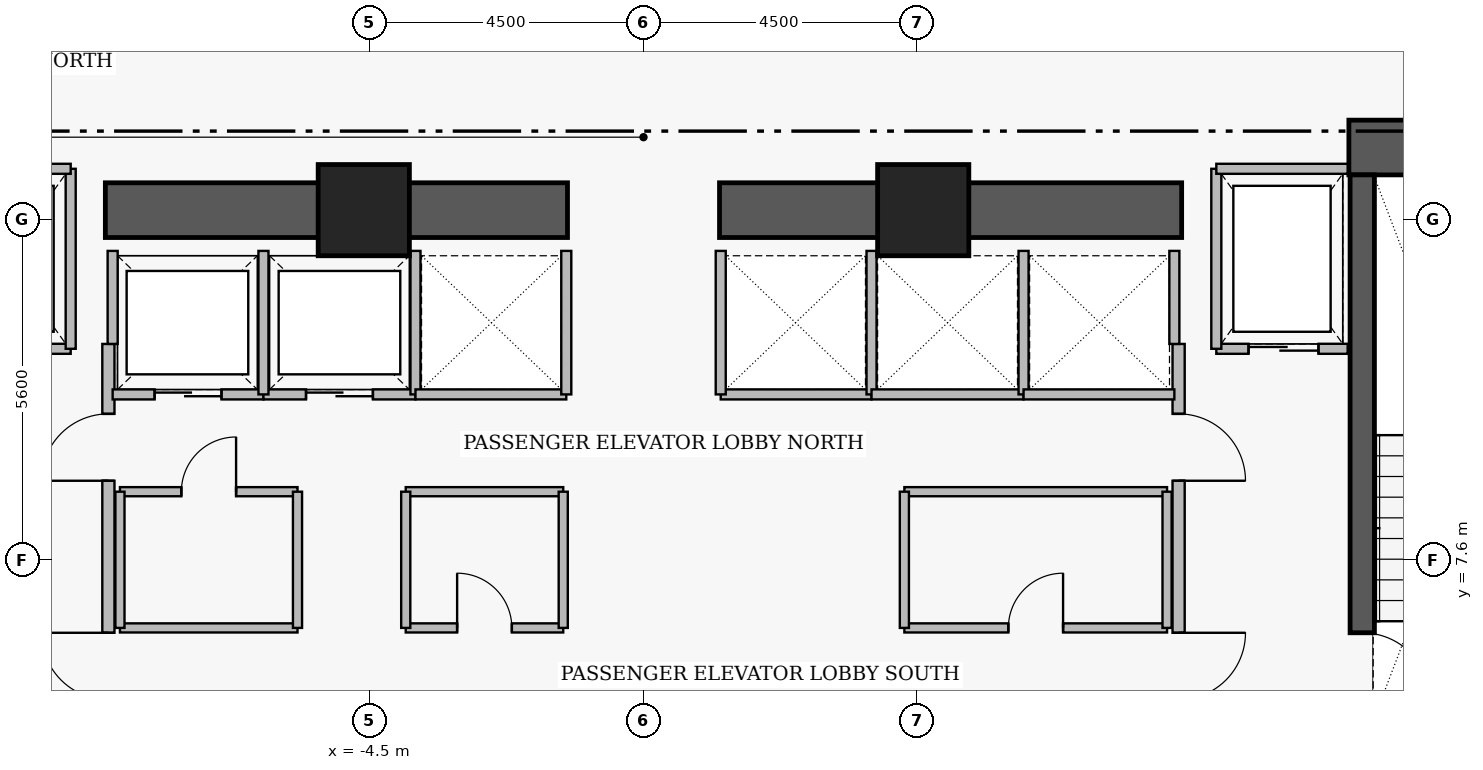
"""IFC4 building model, lengths in metres.
Left out: names, types, materials, properties, quantities, classifications, styles, units other than length and angle.
Written with IfcOpenShell. Run it as: python <this file> out.ifc"""

import sys

from ifc_helpers import new_model, si_unit, direction, frame, frame_2d, origin, origin_2d, place, context, subcontext, project, spatial, rectangle, extrude, element, fill, save


model = new_model("IFC4")
c1 = context("Model", 3, precision=1e-05, world=origin(), true_north=direction((0.0, 1.0)))
c2 = subcontext(c1, "Body", "Model", "MODEL_VIEW")
j1 = project(units=[si_unit("LENGTHUNIT", "METRE"), si_unit("PLANEANGLEUNIT", "RADIAN")], contexts=[c1])
p1 = place(None, origin())
s1 = spatial("IfcSite", under=j1, at=p1, CompositionType="ELEMENT")
p2 = place(p1, origin())
s2 = spatial("IfcBuilding", under=s1, at=p2, CompositionType="ELEMENT")
p3 = place(p2, frame((0.0, 0.0, 71.4)))
s3 = spatial("IfcBuildingStorey", under=s2, at=p3, CompositionType="ELEMENT", Elevation=71.4)
p4 = place(p3, frame((11.6, 14.38, 0.0), z_axis=(0.0, 0.0, 1.0), x_axis=(1.0, 0.0, 0.0)))
e1 = element("IfcWall", 1, at=p4, inside=s3, PredefinedType="SHEAR", context=c2, shape_type="SweptSolid", body=[
    extrude(rectangle(XDim=4.71, YDim=0.9, at=frame_2d((2.355, 0.0))), origin(), (0.0, 0.0, 1.0), 3.46),
])
for number, where, z_axis, x_axis in (
    (2, (-8.85, 13.35, 0.0), (0.0, 0.0, 1.0), (1.0, 0.0, 0.0)),
    (3, (1.25, 13.35, 0.0), (0.0, 0.0, 1.0), (1.0, 0.0, 0.0)),
):
    element("IfcWall", number, at=place(p3, frame(where, z_axis=z_axis, x_axis=x_axis)), inside=s3, PredefinedType="SHEAR", context=c2, shape_type="SweptSolid", body=[
        extrude(rectangle(XDim=7.6, YDim=0.9, at=frame_2d((3.8, 0.0))), origin(), (0.0, 0.0, 1.0), 3.43),
    ])
p5 = place(p3, frame((11.82, 13.93, 0.0), z_axis=(0.0, 0.0, 1.0), x_axis=(0.0, -1.0, 0.0)))
e4 = element("IfcWall", 4, at=p5, inside=s3, PredefinedType="SHEAR", context=c2, shape_type="SweptSolid", body=[
    extrude(rectangle(XDim=8.96, YDim=0.4, at=frame_2d((4.48, 0.0))), origin(), (0.0, 0.0, 1.0), 3.46),
])
p6 = place(p5, frame((7.53, 0.0, 0.0)))
e5 = element("IfcOpeningElement", 5, at=p6, cuts=e4, PredefinedType="OPENING", context=c2, shape_type="SweptSolid", body=[
    extrude(rectangle(XDim=1.12, YDim=2.22, at=frame_2d((0.56, 1.11))), frame((0.0, 0.21, 0.0), z_axis=(0.0, -1.0, 0.0), x_axis=(1.0, 0.0, 0.0)), (0.0, 0.0, 1.0), 0.42),
])
for number, where, z_axis, x_axis in (
    (6, (-4.6, 13.35, 0.0), (0.0, 0.0, 1.0), (1.0, 0.0, 0.0)),
    (7, (4.6, 13.35, 0.0), (0.0, 0.0, 1.0), (1.0, 0.0, 0.0)),
):
    element("IfcColumn", number, at=place(p3, frame(where, z_axis=z_axis, x_axis=x_axis)), inside=s3, PredefinedType="COLUMN", context=c2, shape_type="SweptSolid", body=[
        extrude(rectangle(XDim=1.5, YDim=1.5, at=origin_2d()), origin(), (0.0, 0.0, 1.0), 3.65),
    ])
p7 = place(p3, frame((-8.8, 5.05, 0.0), z_axis=(0.0, 0.0, 1.0), x_axis=(0.0, 1.0, 0.0)))
e8 = element("IfcWall", 8, at=p7, inside=s3, PredefinedType="PARTITIONING", context=c2, shape_type="SweptSolid", body=[
    extrude(rectangle(XDim=6.1, YDim=0.2, at=frame_2d((3.05, 0.0))), origin(), (0.0, 0.0, 1.0), 3.43),
])
p8 = place(p7, frame((0.25, 0.0, 0.0)))
e9 = element("IfcOpeningElement", 9, at=p8, cuts=e8, PredefinedType="OPENING", context=c2, shape_type="SweptSolid", body=[
    extrude(rectangle(XDim=1.1, YDim=2.2, at=frame_2d((0.55, 1.1))), frame((0.0, 0.11, 0.0), z_axis=(0.0, -1.0, 0.0), x_axis=(1.0, 0.0, 0.0)), (0.0, 0.0, 1.0), 0.22),
])
p9 = place(p7, frame((3.85, 0.0, 0.0)))
e10 = element("IfcOpeningElement", 10, at=p9, cuts=e8, PredefinedType="OPENING", context=c2, shape_type="SweptSolid", body=[
    extrude(rectangle(XDim=1.1, YDim=2.2, at=frame_2d((0.55, 1.1))), frame((0.0, 0.11, 0.0), z_axis=(0.0, -1.0, 0.0), x_axis=(1.0, 0.0, 0.0)), (0.0, 0.0, 1.0), 0.22),
])
p10 = place(p3, frame((8.8, 11.15, 0.0), z_axis=(0.0, 0.0, 1.0), x_axis=(0.0, -1.0, 0.0)))
e11 = element("IfcWall", 11, at=p10, inside=s3, PredefinedType="PARTITIONING", context=c2, shape_type="SweptSolid", body=[
    extrude(rectangle(XDim=6.1, YDim=0.2, at=frame_2d((3.05, 0.0))), origin(), (0.0, 0.0, 1.0), 3.43),
])
p11 = place(p10, frame((1.15, 0.0, 0.0)))
e12 = element("IfcOpeningElement", 12, at=p11, cuts=e11, PredefinedType="OPENING", context=c2, shape_type="SweptSolid", body=[
    extrude(rectangle(XDim=1.1, YDim=2.2, at=frame_2d((0.55, 1.1))), frame((0.0, 0.11, 0.0), z_axis=(0.0, -1.0, 0.0), x_axis=(1.0, 0.0, 0.0)), (0.0, 0.0, 1.0), 0.22),
])
p12 = place(p10, frame((4.75, 0.0, 0.0)))
e13 = element("IfcOpeningElement", 13, at=p12, cuts=e11, PredefinedType="OPENING", context=c2, shape_type="SweptSolid", body=[
    extrude(rectangle(XDim=1.1, YDim=2.2, at=frame_2d((0.55, 1.1))), frame((0.0, 0.11, 0.0), z_axis=(0.0, -1.0, 0.0), x_axis=(1.0, 0.0, 0.0)), (0.0, 0.0, 1.0), 0.22),
])
p13 = place(p3, frame((-11.58, 11.07, 0.0), z_axis=(0.0, 0.0, 1.0), x_axis=(1.0, 0.0, 0.0)))
e14 = element("IfcWall", 14, at=p13, inside=s3, PredefinedType="PARTITIONING", context=c2, shape_type="SweptSolid", body=[
    extrude(rectangle(XDim=2.16, YDim=0.165, at=frame_2d((1.08, 0.0))), origin(), (0.0, 0.0, 1.0), 3.43),
])
p14 = place(p13, frame((0.53, 0.0, 0.0)))
e15 = element("IfcOpeningElement", 15, at=p14, cuts=e14, PredefinedType="OPENING", context=c2, shape_type="SweptSolid", body=[
    extrude(rectangle(XDim=1.15, YDim=2.25, at=frame_2d((0.575, 1.125))), frame((0.0, 0.093, 0.0), z_axis=(0.0, -1.0, 0.0), x_axis=(1.0, 0.0, 0.0)), (0.0, 0.0, 1.0), 0.185),
])
p15 = place(p3, frame((9.42, 11.07, 0.0), z_axis=(0.0, 0.0, 1.0), x_axis=(1.0, 0.0, 0.0)))
e16 = element("IfcWall", 16, at=p15, inside=s3, PredefinedType="PARTITIONING", context=c2, shape_type="SweptSolid", body=[
    extrude(rectangle(XDim=2.16, YDim=0.165, at=frame_2d((1.08, 0.0))), origin(), (0.0, 0.0, 1.0), 3.43),
])
p16 = place(p15, frame((0.53, 0.0, 0.0)))
e17 = element("IfcOpeningElement", 17, at=p16, cuts=e16, PredefinedType="OPENING", context=c2, shape_type="SweptSolid", body=[
    extrude(rectangle(XDim=1.15, YDim=2.25, at=frame_2d((0.575, 1.125))), frame((0.0, 0.093, 0.0), z_axis=(0.0, -1.0, 0.0), x_axis=(1.0, 0.0, 0.0)), (0.0, 0.0, 1.0), 0.185),
])
p17 = place(p3, frame((-8.73, 10.32, 0.0), z_axis=(0.0, 0.0, 1.0), x_axis=(1.0, 0.0, 0.0)))
e18 = element("IfcWall", 18, at=p17, inside=s3, PredefinedType="PARTITIONING", context=c2, shape_type="SweptSolid", body=[
    extrude(rectangle(XDim=2.48, YDim=0.165, at=frame_2d((1.24, 0.0))), origin(), (0.0, 0.0, 1.0), 3.43),
])
p18 = place(p17, frame((0.69, 0.0, 0.0)))
e19 = element("IfcOpeningElement", 19, at=p18, cuts=e18, PredefinedType="OPENING", context=c2, shape_type="SweptSolid", body=[
    extrude(rectangle(XDim=1.1, YDim=2.25, at=frame_2d((0.55, 1.125))), frame((0.0, 0.093, 0.0), z_axis=(0.0, -1.0, 0.0), x_axis=(1.0, 0.0, 0.0)), (0.0, 0.0, 1.0), 0.185),
])
p19 = place(p3, frame((-6.25, 10.32, 0.0), z_axis=(0.0, 0.0, 1.0), x_axis=(1.0, 0.0, 0.0)))
e20 = element("IfcWall", 20, at=p19, inside=s3, PredefinedType="PARTITIONING", context=c2, shape_type="SweptSolid", body=[
    extrude(rectangle(XDim=2.5, YDim=0.165, at=frame_2d((1.25, 0.0))), origin(), (0.0, 0.0, 1.0), 3.43),
])
p20 = place(p19, frame((0.7, 0.0, 0.0)))
e21 = element("IfcOpeningElement", 21, at=p20, cuts=e20, PredefinedType="OPENING", context=c2, shape_type="SweptSolid", body=[
    extrude(rectangle(XDim=1.1, YDim=2.25, at=frame_2d((0.55, 1.125))), frame((0.0, 0.093, 0.0), z_axis=(0.0, -1.0, 0.0), x_axis=(1.0, 0.0, 0.0)), (0.0, 0.0, 1.0), 0.185),
])
p21 = place(p3, frame((-8.61, 8.72, 0.0), z_axis=(0.0, 0.0, 1.0), x_axis=(1.0, 0.0, 0.0)))
e22 = element("IfcWall", 22, at=p21, inside=s3, PredefinedType="PARTITIONING", context=c2, shape_type="SweptSolid", body=[
    extrude(rectangle(XDim=2.92, YDim=0.15, at=frame_2d((1.46, 0.0))), origin(), (0.0, 0.0, 1.0), 3.43),
])
p22 = place(p21, frame((1.01, 0.0, 0.0)))
e23 = element("IfcOpeningElement", 23, at=p22, cuts=e22, PredefinedType="OPENING", context=c2, shape_type="SweptSolid", body=[
    extrude(rectangle(XDim=0.9, YDim=2.15, at=frame_2d((0.45, 1.075))), frame((0.0, 0.085, 0.0), z_axis=(0.0, -1.0, 0.0), x_axis=(1.0, 0.0, 0.0)), (0.0, 0.0, 1.0), 0.17),
])
p23 = place(p3, frame((-3.91, 6.48, 0.0), z_axis=(0.0, 0.0, 1.0), x_axis=(1.0, 0.0, 0.0)))
e24 = element("IfcWall", 24, at=p23, inside=s3, PredefinedType="PARTITIONING", context=c2, shape_type="SweptSolid", body=[
    extrude(rectangle(XDim=2.59, YDim=0.15, at=frame_2d((1.295, 0.0))), origin(), (0.0, 0.0, 1.0), 3.43),
])
p24 = place(p23, frame((0.845, 0.0, 0.0)))
e25 = element("IfcOpeningElement", 25, at=p24, cuts=e24, PredefinedType="OPENING", context=c2, shape_type="SweptSolid", body=[
    extrude(rectangle(XDim=0.9, YDim=2.15, at=frame_2d((0.45, 1.075))), frame((0.0, 0.085, 0.0), z_axis=(0.0, -1.0, 0.0), x_axis=(1.0, 0.0, 0.0)), (0.0, 0.0, 1.0), 0.17),
])
p25 = place(p3, frame((4.29, 6.48, 0.0), z_axis=(0.0, 0.0, 1.0), x_axis=(1.0, 0.0, 0.0)))
e26 = element("IfcWall", 26, at=p25, inside=s3, PredefinedType="PARTITIONING", context=c2, shape_type="SweptSolid", body=[
    extrude(rectangle(XDim=4.32, YDim=0.15, at=frame_2d((2.16, 0.0))), origin(), (0.0, 0.0, 1.0), 3.43),
])
p26 = place(p25, frame((1.71, 0.0, 0.0)))
e27 = element("IfcOpeningElement", 27, at=p26, cuts=e26, PredefinedType="OPENING", context=c2, shape_type="SweptSolid", body=[
    extrude(rectangle(XDim=0.9, YDim=2.15, at=frame_2d((0.45, 1.075))), frame((0.0, 0.085, 0.0), z_axis=(0.0, -1.0, 0.0), x_axis=(1.0, 0.0, 0.0)), (0.0, 0.0, 1.0), 0.17),
])
p27 = place(p3, frame((-9.42, 11.07, 0.0), z_axis=(0.0, 0.0, 1.0), x_axis=(0.0, 1.0, 0.0)))
e28 = element("IfcWall", 28, at=p27, inside=s3, PredefinedType="PARTITIONING", context=c2, shape_type="SweptSolid", body=[
    extrude(rectangle(XDim=2.96, YDim=0.165, at=frame_2d((1.48, 0.0))), origin(), (0.0, 0.0, 1.0), 3.43),
])
p28 = place(p3, frame((-11.58, 14.03, 0.0), z_axis=(0.0, 0.0, 1.0), x_axis=(1.0, 0.0, 0.0)))
e29 = element("IfcWall", 29, at=p28, inside=s3, PredefinedType="PARTITIONING", context=c2, shape_type="SweptSolid", body=[
    extrude(rectangle(XDim=2.16, YDim=0.165, at=frame_2d((1.08, 0.0))), origin(), (0.0, 0.0, 1.0), 3.43),
])
p29 = place(p3, frame((9.42, 11.07, 0.0), z_axis=(0.0, 0.0, 1.0), x_axis=(0.0, 1.0, 0.0)))
e30 = element("IfcWall", 30, at=p29, inside=s3, PredefinedType="PARTITIONING", context=c2, shape_type="SweptSolid", body=[
    extrude(rectangle(XDim=2.96, YDim=0.165, at=frame_2d((1.48, 0.0))), origin(), (0.0, 0.0, 1.0), 3.43),
])
p30 = place(p3, frame((9.42, 14.03, 0.0), z_axis=(0.0, 0.0, 1.0), x_axis=(1.0, 0.0, 0.0)))
e31 = element("IfcWall", 31, at=p30, inside=s3, PredefinedType="PARTITIONING", context=c2, shape_type="SweptSolid", body=[
    extrude(rectangle(XDim=2.16, YDim=0.165, at=frame_2d((1.08, 0.0))), origin(), (0.0, 0.0, 1.0), 3.43),
])
p31 = place(p3, frame((-8.73, 11.15, 0.0), z_axis=(0.0, 0.0, 1.0), x_axis=(0.0, 1.0, 0.0)))
e32 = element("IfcWall", 32, at=p31, inside=s3, PredefinedType="PARTITIONING", context=c2, shape_type="SweptSolid", body=[
    extrude(rectangle(XDim=1.53, YDim=0.165, at=frame_2d((0.765, 0.0))), origin(), (0.0, 0.0, 1.0), 3.43),
])
for number, where, z_axis, x_axis in (
    (33, (-6.25, 10.32, 0.0), (0.0, 0.0, 1.0), (0.0, 1.0, 0.0)),
    (34, (-3.75, 10.32, 0.0), (0.0, 0.0, 1.0), (0.0, 1.0, 0.0)),
):
    element("IfcWall", number, at=place(p3, frame(where, z_axis=z_axis, x_axis=x_axis)), inside=s3, PredefinedType="PARTITIONING", context=c2, shape_type="SweptSolid", body=[
        extrude(rectangle(XDim=2.36, YDim=0.165, at=frame_2d((1.18, 0.0))), origin(), (0.0, 0.0, 1.0), 3.43),
    ])
p32 = place(p3, frame((-3.75, 10.32, 0.0), z_axis=(0.0, 0.0, 1.0), x_axis=(1.0, 0.0, 0.0)))
e35 = element("IfcWall", 35, at=p32, inside=s3, PredefinedType="PARTITIONING", context=c2, shape_type="SweptSolid", body=[
    extrude(rectangle(XDim=2.48, YDim=0.165, at=frame_2d((1.24, 0.0))), origin(), (0.0, 0.0, 1.0), 3.43),
])
p33 = place(p3, frame((-1.27, 10.32, 0.0), z_axis=(0.0, 0.0, 1.0), x_axis=(0.0, 1.0, 0.0)))
e36 = element("IfcWall", 36, at=p33, inside=s3, PredefinedType="PARTITIONING", context=c2, shape_type="SweptSolid", body=[
    extrude(rectangle(XDim=2.36, YDim=0.165, at=frame_2d((1.18, 0.0))), origin(), (0.0, 0.0, 1.0), 3.43),
])
p34 = place(p3, frame((1.27, 10.32, 0.0), z_axis=(0.0, 0.0, 1.0), x_axis=(1.0, 0.0, 0.0)))
e37 = element("IfcWall", 37, at=p34, inside=s3, PredefinedType="PARTITIONING", context=c2, shape_type="SweptSolid", body=[
    extrude(rectangle(XDim=2.48, YDim=0.165, at=frame_2d((1.24, 0.0))), origin(), (0.0, 0.0, 1.0), 3.43),
])
for number, where, z_axis, x_axis in (
    (38, (1.27, 10.32, 0.0), (0.0, 0.0, 1.0), (0.0, 1.0, 0.0)),
    (39, (3.75, 10.32, 0.0), (0.0, 0.0, 1.0), (0.0, 1.0, 0.0)),
):
    element("IfcWall", number, at=place(p3, frame(where, z_axis=z_axis, x_axis=x_axis)), inside=s3, PredefinedType="PARTITIONING", context=c2, shape_type="SweptSolid", body=[
        extrude(rectangle(XDim=2.36, YDim=0.165, at=frame_2d((1.18, 0.0))), origin(), (0.0, 0.0, 1.0), 3.43),
    ])
p35 = place(p3, frame((3.75, 10.32, 0.0), z_axis=(0.0, 0.0, 1.0), x_axis=(1.0, 0.0, 0.0)))
e40 = element("IfcWall", 40, at=p35, inside=s3, PredefinedType="PARTITIONING", context=c2, shape_type="SweptSolid", body=[
    extrude(rectangle(XDim=2.5, YDim=0.165, at=frame_2d((1.25, 0.0))), origin(), (0.0, 0.0, 1.0), 3.43),
])
p36 = place(p3, frame((6.25, 10.32, 0.0), z_axis=(0.0, 0.0, 1.0), x_axis=(0.0, 1.0, 0.0)))
e41 = element("IfcWall", 41, at=p36, inside=s3, PredefinedType="PARTITIONING", context=c2, shape_type="SweptSolid", body=[
    extrude(rectangle(XDim=2.36, YDim=0.165, at=frame_2d((1.18, 0.0))), origin(), (0.0, 0.0, 1.0), 3.43),
])
p37 = place(p3, frame((6.25, 10.32, 0.0), z_axis=(0.0, 0.0, 1.0), x_axis=(1.0, 0.0, 0.0)))
e42 = element("IfcWall", 42, at=p37, inside=s3, PredefinedType="PARTITIONING", context=c2, shape_type="SweptSolid", body=[
    extrude(rectangle(XDim=2.48, YDim=0.165, at=frame_2d((1.24, 0.0))), origin(), (0.0, 0.0, 1.0), 3.43),
])
p38 = place(p3, frame((8.73, 11.15, 0.0), z_axis=(0.0, 0.0, 1.0), x_axis=(0.0, 1.0, 0.0)))
e43 = element("IfcWall", 43, at=p38, inside=s3, PredefinedType="PARTITIONING", context=c2, shape_type="SweptSolid", body=[
    extrude(rectangle(XDim=1.53, YDim=0.165, at=frame_2d((0.765, 0.0))), origin(), (0.0, 0.0, 1.0), 3.43),
])
p39 = place(p3, frame((-8.61, 6.48, 0.0), z_axis=(0.0, 0.0, 1.0), x_axis=(1.0, 0.0, 0.0)))
e44 = element("IfcWall", 44, at=p39, inside=s3, PredefinedType="PARTITIONING", context=c2, shape_type="SweptSolid", body=[
    extrude(rectangle(XDim=2.92, YDim=0.15, at=frame_2d((1.46, 0.0))), origin(), (0.0, 0.0, 1.0), 3.43),
])
for number, where, z_axis, x_axis in (
    (45, (-8.61, 6.48, 0.0), (0.0, 0.0, 1.0), (0.0, 1.0, 0.0)),
    (46, (-5.69, 6.48, 0.0), (0.0, 0.0, 1.0), (0.0, 1.0, 0.0)),
):
    element("IfcWall", number, at=place(p3, frame(where, z_axis=z_axis, x_axis=x_axis)), inside=s3, PredefinedType="PARTITIONING", context=c2, shape_type="SweptSolid", body=[
        extrude(rectangle(XDim=2.24, YDim=0.15, at=frame_2d((1.12, 0.0))), origin(), (0.0, 0.0, 1.0), 3.43),
    ])
p40 = place(p3, frame((-3.91, 8.72, 0.0), z_axis=(0.0, 0.0, 1.0), x_axis=(1.0, 0.0, 0.0)))
e47 = element("IfcWall", 47, at=p40, inside=s3, PredefinedType="PARTITIONING", context=c2, shape_type="SweptSolid", body=[
    extrude(rectangle(XDim=2.59, YDim=0.15, at=frame_2d((1.295, 0.0))), origin(), (0.0, 0.0, 1.0), 3.43),
])
for number, where, z_axis, x_axis in (
    (48, (-3.91, 6.48, 0.0), (0.0, 0.0, 1.0), (0.0, 1.0, 0.0)),
    (49, (-1.32, 6.48, 0.0), (0.0, 0.0, 1.0), (0.0, 1.0, 0.0)),
):
    element("IfcWall", number, at=place(p3, frame(where, z_axis=z_axis, x_axis=x_axis)), inside=s3, PredefinedType="PARTITIONING", context=c2, shape_type="SweptSolid", body=[
        extrude(rectangle(XDim=2.24, YDim=0.15, at=frame_2d((1.12, 0.0))), origin(), (0.0, 0.0, 1.0), 3.43),
    ])
p41 = place(p3, frame((4.29, 8.72, 0.0), z_axis=(0.0, 0.0, 1.0), x_axis=(1.0, 0.0, 0.0)))
e50 = element("IfcWall", 50, at=p41, inside=s3, PredefinedType="PARTITIONING", context=c2, shape_type="SweptSolid", body=[
    extrude(rectangle(XDim=4.32, YDim=0.15, at=frame_2d((2.16, 0.0))), origin(), (0.0, 0.0, 1.0), 3.43),
])
for number, where, z_axis, x_axis in (
    (51, (4.29, 6.48, 0.0), (0.0, 0.0, 1.0), (0.0, 1.0, 0.0)),
    (52, (8.61, 6.48, 0.0), (0.0, 0.0, 1.0), (0.0, 1.0, 0.0)),
):
    element("IfcWall", number, at=place(p3, frame(where, z_axis=z_axis, x_axis=x_axis)), inside=s3, PredefinedType="PARTITIONING", context=c2, shape_type="SweptSolid", body=[
        extrude(rectangle(XDim=2.24, YDim=0.15, at=frame_2d((1.12, 0.0))), origin(), (0.0, 0.0, 1.0), 3.43),
    ])
p42 = place(p6, origin())
e53 = element("IfcDoor", 53, at=p42, inside=s3, OperationType="SINGLE_SWING_RIGHT", PredefinedType="DOOR", context=c2, shape_type="SweptSolid", body=[
    extrude(rectangle(XDim=1.12, YDim=2.22, at=frame_2d((0.56, 1.11))), frame((0.0, 0.025, 0.0), z_axis=(0.0, -1.0, 0.0), x_axis=(1.0, 0.0, 0.0)), (0.0, 0.0, 1.0), 0.05),
])
fill(e5, e53)
p43 = place(p8, origin())
e54 = element("IfcDoor", 54, at=p43, inside=s3, OperationType="SINGLE_SWING_RIGHT", PredefinedType="DOOR", context=c2, shape_type="SweptSolid", body=[
    extrude(rectangle(XDim=1.1, YDim=2.2, at=frame_2d((0.55, 1.1))), frame((0.0, 0.025, 0.0), z_axis=(0.0, -1.0, 0.0), x_axis=(1.0, 0.0, 0.0)), (0.0, 0.0, 1.0), 0.05),
])
fill(e9, e54)
p44 = place(p9, origin())
e55 = element("IfcDoor", 55, at=p44, inside=s3, OperationType="SINGLE_SWING_LEFT", PredefinedType="DOOR", context=c2, shape_type="SweptSolid", body=[
    extrude(rectangle(XDim=1.1, YDim=2.2, at=frame_2d((0.55, 1.1))), frame((0.0, 0.025, 0.0), z_axis=(0.0, -1.0, 0.0), x_axis=(1.0, 0.0, 0.0)), (0.0, 0.0, 1.0), 0.05),
])
fill(e10, e55)
p45 = place(p11, origin())
e56 = element("IfcDoor", 56, at=p45, inside=s3, OperationType="SINGLE_SWING_RIGHT", PredefinedType="DOOR", context=c2, shape_type="SweptSolid", body=[
    extrude(rectangle(XDim=1.1, YDim=2.2, at=frame_2d((0.55, 1.1))), frame((0.0, 0.025, 0.0), z_axis=(0.0, -1.0, 0.0), x_axis=(1.0, 0.0, 0.0)), (0.0, 0.0, 1.0), 0.05),
])
fill(e12, e56)
p46 = place(p12, origin())
e57 = element("IfcDoor", 57, at=p46, inside=s3, OperationType="SINGLE_SWING_LEFT", PredefinedType="DOOR", context=c2, shape_type="SweptSolid", body=[
    extrude(rectangle(XDim=1.1, YDim=2.2, at=frame_2d((0.55, 1.1))), frame((0.0, 0.025, 0.0), z_axis=(0.0, -1.0, 0.0), x_axis=(1.0, 0.0, 0.0)), (0.0, 0.0, 1.0), 0.05),
])
fill(e13, e57)
p47 = place(p16, origin())
e58 = element("IfcDoor", 58, at=p47, inside=s3, OperationType="SLIDING_TO_LEFT", PredefinedType="DOOR", context=c2, shape_type="SweptSolid", body=[
    extrude(rectangle(XDim=1.15, YDim=2.25, at=frame_2d((0.575, 1.125))), frame((0.0, 0.025, 0.0), z_axis=(0.0, -1.0, 0.0), x_axis=(1.0, 0.0, 0.0)), (0.0, 0.0, 1.0), 0.05),
])
fill(e17, e58)
p48 = place(p18, origin())
e59 = element("IfcDoor", 59, at=p48, inside=s3, OperationType="SLIDING_TO_LEFT", PredefinedType="DOOR", context=c2, shape_type="SweptSolid", body=[
    extrude(rectangle(XDim=1.1, YDim=2.25, at=frame_2d((0.55, 1.125))), frame((0.0, 0.025, 0.0), z_axis=(0.0, -1.0, 0.0), x_axis=(1.0, 0.0, 0.0)), (0.0, 0.0, 1.0), 0.05),
])
fill(e19, e59)
p49 = place(p20, origin())
e60 = element("IfcDoor", 60, at=p49, inside=s3, OperationType="SLIDING_TO_LEFT", PredefinedType="DOOR", context=c2, shape_type="SweptSolid", body=[
    extrude(rectangle(XDim=1.1, YDim=2.25, at=frame_2d((0.55, 1.125))), frame((0.0, 0.025, 0.0), z_axis=(0.0, -1.0, 0.0), x_axis=(1.0, 0.0, 0.0)), (0.0, 0.0, 1.0), 0.05),
])
fill(e21, e60)
p50 = place(p22, origin())
e61 = element("IfcDoor", 61, at=p50, inside=s3, OperationType="SINGLE_SWING_RIGHT", PredefinedType="DOOR", context=c2, shape_type="SweptSolid", body=[
    extrude(rectangle(XDim=0.9, YDim=2.15, at=frame_2d((0.45, 1.075))), frame((0.0, 0.025, 0.0), z_axis=(0.0, -1.0, 0.0), x_axis=(1.0, 0.0, 0.0)), (0.0, 0.0, 1.0), 0.05),
])
fill(e23, e61)
p51 = place(p24, origin())
e62 = element("IfcDoor", 62, at=p51, inside=s3, OperationType="SINGLE_SWING_LEFT", PredefinedType="DOOR", context=c2, shape_type="SweptSolid", body=[
    extrude(rectangle(XDim=0.9, YDim=2.15, at=frame_2d((0.45, 1.075))), frame((0.0, 0.025, 0.0), z_axis=(0.0, -1.0, 0.0), x_axis=(1.0, 0.0, 0.0)), (0.0, 0.0, 1.0), 0.05),
])
fill(e25, e62)
p52 = place(p26, origin())
e63 = element("IfcDoor", 63, at=p52, inside=s3, OperationType="SINGLE_SWING_RIGHT", PredefinedType="DOOR", context=c2, shape_type="SweptSolid", body=[
    extrude(rectangle(XDim=0.9, YDim=2.15, at=frame_2d((0.45, 1.075))), frame((0.0, 0.025, 0.0), z_axis=(0.0, -1.0, 0.0), x_axis=(1.0, 0.0, 0.0)), (0.0, 0.0, 1.0), 0.05),
])
fill(e27, e63)
save(model, sys.argv[1])
